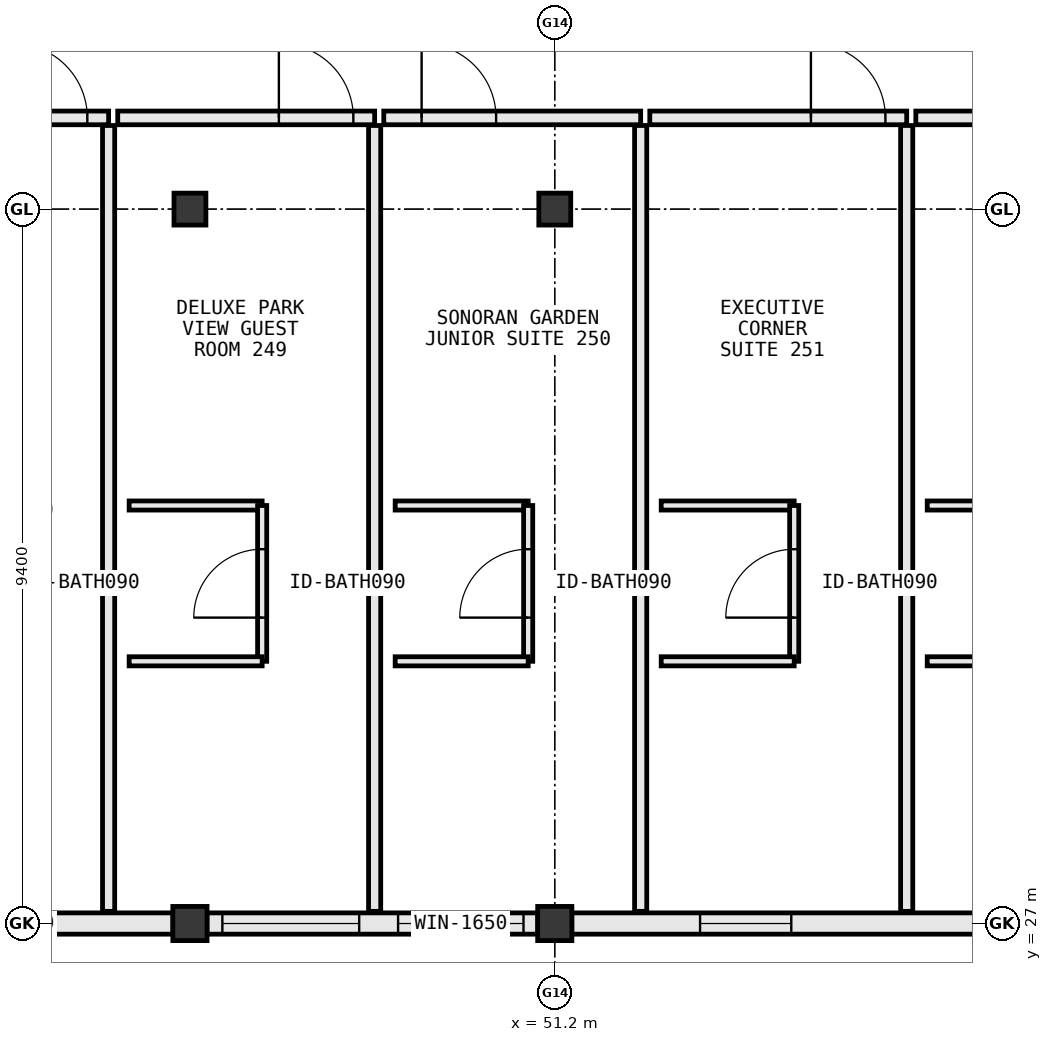
"""IFC4 building model, lengths in metres.
Left out: names, types, materials, properties, quantities, classifications, styles, units other than length and angle.
Written with IfcOpenShell. Run it as: python <this file> out.ifc"""

import sys

from ifc_helpers import new_model, si_unit, direction, frame, frame_2d, origin, origin_2d, place, context, subcontext, project, spatial, rectangle, extrude, element, fill, save


model = new_model("IFC4")
c1 = context("Model", 3, precision=1e-05, world=origin(), true_north=direction((0.0, 1.0)))
c2 = subcontext(c1, "Body", "Model", "MODEL_VIEW")
j1 = project(units=[si_unit("LENGTHUNIT", "METRE"), si_unit("PLANEANGLEUNIT", "RADIAN")], contexts=[c1])
p1 = place(None, origin())
s1 = spatial("IfcSite", under=j1, at=p1, CompositionType="ELEMENT")
p2 = place(p1, origin())
s2 = spatial("IfcBuilding", under=s1, at=p2, CompositionType="ELEMENT")
p3 = place(p2, frame((0.0, 0.0, 35.2)))
s3 = spatial("IfcBuildingStorey", under=s2, at=p3, CompositionType="ELEMENT", Elevation=35.2)
p4 = place(p3, frame((46.4, 27.0, 0.0), z_axis=(0.0, 0.0, 1.0), x_axis=(1.0, 0.0, 0.0)))
e1 = element("IfcColumn", 1, at=p4, inside=s3, PredefinedType="COLUMN", context=c2, shape_type="SweptSolid", body=[
    extrude(rectangle(XDim=0.45, YDim=0.45, at=origin_2d()), origin(), (0.0, 0.0, 1.0), 3.8),
])
p5 = place(p3, frame((46.4, 36.4, 0.0), z_axis=(0.0, 0.0, 1.0), x_axis=(1.0, 0.0, 0.0)))
e2 = element("IfcColumn", 2, at=p5, inside=s3, PredefinedType="COLUMN", context=c2, shape_type="SweptSolid", body=[
    extrude(rectangle(XDim=0.42, YDim=0.42, at=origin_2d()), origin(), (0.0, 0.0, 1.0), 3.8),
])
p6 = place(p3, frame((51.2, 27.0, 0.0), z_axis=(0.0, 0.0, 1.0), x_axis=(1.0, 0.0, 0.0)))
e3 = element("IfcColumn", 3, at=p6, inside=s3, PredefinedType="COLUMN", context=c2, shape_type="SweptSolid", body=[
    extrude(rectangle(XDim=0.45, YDim=0.45, at=origin_2d()), origin(), (0.0, 0.0, 1.0), 3.8),
])
p7 = place(p3, frame((51.2, 36.4, 0.0), z_axis=(0.0, 0.0, 1.0), x_axis=(1.0, 0.0, 0.0)))
e4 = element("IfcColumn", 4, at=p7, inside=s3, PredefinedType="COLUMN", context=c2, shape_type="SweptSolid", body=[
    extrude(rectangle(XDim=0.42, YDim=0.42, at=origin_2d()), origin(), (0.0, 0.0, 1.0), 3.8),
])
p8 = place(p3, frame((41.823, 27.0, 0.0), z_axis=(0.0, 0.0, 1.0), x_axis=(1.0, 0.0, 0.0)))
e5 = element("IfcWall", 5, at=p8, inside=s3, PredefinedType="STANDARD", context=c2, shape_type="SweptSolid", body=[
    extrude(rectangle(XDim=4.354, YDim=0.28, at=frame_2d((2.177, 0.0))), origin(), (0.0, 0.0, 1.0), 3.02),
])
p9 = place(p8, frame((1.577, 0.0, 0.85)))
e6 = element("IfcOpeningElement", 6, at=p9, cuts=e5, PredefinedType="OPENING", context=c2, shape_type="SweptSolid", body=[
    extrude(rectangle(XDim=1.2, YDim=1.55, at=frame_2d((0.6, 0.775))), frame((0.0, 0.152, 0.0), z_axis=(0.0, -1.0, 0.0), x_axis=(1.0, 0.0, 0.0)), (0.0, 0.0, 1.0), 0.304),
])
p10 = place(p3, frame((46.623, 27.0, 0.0), z_axis=(0.0, 0.0, 1.0), x_axis=(1.0, 0.0, 0.0)))
e7 = element("IfcWall", 7, at=p10, inside=s3, PredefinedType="STANDARD", context=c2, shape_type="SweptSolid", body=[
    extrude(rectangle(XDim=4.354, YDim=0.28, at=frame_2d((2.177, 0.0))), origin(), (0.0, 0.0, 1.0), 3.02),
])
p11 = place(p10, frame((0.204, 0.0, 0.85)))
e8 = element("IfcOpeningElement", 8, at=p11, cuts=e7, PredefinedType="OPENING", context=c2, shape_type="SweptSolid", body=[
    extrude(rectangle(XDim=1.8, YDim=1.85, at=frame_2d((0.9, 0.925))), frame((0.0, 0.152, 0.0), z_axis=(0.0, -1.0, 0.0), x_axis=(1.0, 0.0, 0.0)), (0.0, 0.0, 1.0), 0.304),
])
p12 = place(p10, frame((2.515, 0.0, 0.85)))
e9 = element("IfcOpeningElement", 9, at=p12, cuts=e7, PredefinedType="OPENING", context=c2, shape_type="SweptSolid", body=[
    extrude(rectangle(XDim=1.65, YDim=1.8, at=frame_2d((0.825, 0.9))), frame((0.0, 0.152, 0.0), z_axis=(0.0, -1.0, 0.0), x_axis=(1.0, 0.0, 0.0)), (0.0, 0.0, 1.0), 0.304),
])
p13 = place(p3, frame((51.423, 27.0, 0.0), z_axis=(0.0, 0.0, 1.0), x_axis=(1.0, 0.0, 0.0)))
e10 = element("IfcWall", 10, at=p13, inside=s3, PredefinedType="STANDARD", context=c2, shape_type="SweptSolid", body=[
    extrude(rectangle(XDim=9.154, YDim=0.28, at=frame_2d((4.577, 0.0))), origin(), (0.0, 0.0, 1.0), 2.84),
])
p14 = place(p13, frame((1.688, 0.0, 0.85)))
e11 = element("IfcOpeningElement", 11, at=p14, cuts=e10, PredefinedType="OPENING", context=c2, shape_type="SweptSolid", body=[
    extrude(rectangle(XDim=1.2, YDim=1.55, at=frame_2d((0.6, 0.775))), frame((0.0, 0.152, 0.0), z_axis=(0.0, -1.0, 0.0), x_axis=(1.0, 0.0, 0.0)), (0.0, 0.0, 1.0), 0.304),
])
p15 = place(p13, frame((6.265, 0.0, 0.85)))
e12 = element("IfcOpeningElement", 12, at=p15, cuts=e10, PredefinedType="OPENING", context=c2, shape_type="SweptSolid", body=[
    extrude(rectangle(XDim=1.2, YDim=1.55, at=frame_2d((0.6, 0.775))), frame((0.0, 0.152, 0.0), z_axis=(0.0, -1.0, 0.0), x_axis=(1.0, 0.0, 0.0)), (0.0, 0.0, 1.0), 0.304),
])
p16 = place(p3, frame((45.33, 37.6, 0.0), z_axis=(0.0, 0.0, 1.0), x_axis=(-1.0, 0.0, 0.0)))
e13 = element("IfcWall", 13, at=p16, inside=s3, PredefinedType="PARTITIONING", context=c2, shape_type="SweptSolid", body=[
    extrude(rectangle(XDim=3.38, YDim=0.18, at=frame_2d((1.69, 0.0))), origin(), (0.0, 0.0, 1.0), 3.565),
])
p17 = place(p16, frame((0.28, 0.0, 0.0)))
e14 = element("IfcOpeningElement", 14, at=p17, cuts=e13, PredefinedType="OPENING", context=c2, shape_type="SweptSolid", body=[
    extrude(rectangle(XDim=0.98, YDim=2.18, at=frame_2d((0.49, 1.09))), frame((0.0, 0.102, 0.0), z_axis=(0.0, -1.0, 0.0), x_axis=(1.0, 0.0, 0.0)), (0.0, 0.0, 1.0), 0.204),
])
p18 = place(p3, frame((45.33, 27.16, 0.0), z_axis=(0.0, 0.0, 1.0), x_axis=(0.0, 1.0, 0.0)))
e15 = element("IfcWall", 15, at=p18, inside=s3, PredefinedType="PARTITIONING", context=c2, shape_type="SweptSolid", body=[
    extrude(rectangle(XDim=10.34, YDim=0.16, at=frame_2d((5.17, 0.0))), origin(), (0.0, 0.0, 1.0), 3.565),
])
p19 = place(p3, frame((48.83, 37.6, 0.0), z_axis=(0.0, 0.0, 1.0), x_axis=(-1.0, 0.0, 0.0)))
e16 = element("IfcWall", 16, at=p19, inside=s3, PredefinedType="PARTITIONING", context=c2, shape_type="SweptSolid", body=[
    extrude(rectangle(XDim=3.38, YDim=0.18, at=frame_2d((1.69, 0.0))), origin(), (0.0, 0.0, 1.0), 3.565),
])
p20 = place(p19, frame((0.28, 0.0, 0.0)))
e17 = element("IfcOpeningElement", 17, at=p20, cuts=e16, PredefinedType="OPENING", context=c2, shape_type="SweptSolid", body=[
    extrude(rectangle(XDim=0.98, YDim=2.18, at=frame_2d((0.49, 1.09))), frame((0.0, 0.102, 0.0), z_axis=(0.0, -1.0, 0.0), x_axis=(1.0, 0.0, 0.0)), (0.0, 0.0, 1.0), 0.204),
])
p21 = place(p3, frame((48.83, 27.16, 0.0), z_axis=(0.0, 0.0, 1.0), x_axis=(0.0, 1.0, 0.0)))
e18 = element("IfcWall", 18, at=p21, inside=s3, PredefinedType="PARTITIONING", context=c2, shape_type="SweptSolid", body=[
    extrude(rectangle(XDim=10.34, YDim=0.16, at=frame_2d((5.17, 0.0))), origin(), (0.0, 0.0, 1.0), 3.11),
])
p22 = place(p3, frame((45.6, 32.5, 0.0), z_axis=(0.0, 0.0, 1.0), x_axis=(1.0, 0.0, 0.0)))
e19 = element("IfcWall", 19, at=p22, inside=s3, PredefinedType="PARTITIONING", context=c2, shape_type="SweptSolid", body=[
    extrude(rectangle(XDim=1.75, YDim=0.12, at=frame_2d((0.875, 0.0))), origin(), (0.0, 0.0, 1.0), 3.565),
])
p23 = place(p3, frame((47.35, 30.45, 0.0), z_axis=(0.0, 0.0, 1.0), x_axis=(0.0, 1.0, 0.0)))
e20 = element("IfcWall", 20, at=p23, inside=s3, PredefinedType="PARTITIONING", context=c2, shape_type="SweptSolid", body=[
    extrude(rectangle(XDim=2.05, YDim=0.12, at=frame_2d((1.025, 0.0))), origin(), (0.0, 0.0, 1.0), 3.565),
])
p24 = place(p23, frame((0.575, 0.0, 0.0)))
e21 = element("IfcOpeningElement", 21, at=p24, cuts=e20, PredefinedType="OPENING", context=c2, shape_type="SweptSolid", body=[
    extrude(rectangle(XDim=0.9, YDim=2.15, at=frame_2d((0.45, 1.075))), frame((0.0, 0.072, 0.0), z_axis=(0.0, -1.0, 0.0), x_axis=(1.0, 0.0, 0.0)), (0.0, 0.0, 1.0), 0.144),
])
p25 = place(p3, frame((45.6, 30.45, 0.0), z_axis=(0.0, 0.0, 1.0), x_axis=(1.0, 0.0, 0.0)))
e22 = element("IfcWall", 22, at=p25, inside=s3, PredefinedType="PARTITIONING", context=c2, shape_type="SweptSolid", body=[
    extrude(rectangle(XDim=1.75, YDim=0.12, at=frame_2d((0.875, 0.0))), origin(), (0.0, 0.0, 1.0), 3.565),
])
p26 = place(p3, frame((52.33, 37.6, 0.0), z_axis=(0.0, 0.0, 1.0), x_axis=(-1.0, 0.0, 0.0)))
e23 = element("IfcWall", 23, at=p26, inside=s3, PredefinedType="PARTITIONING", context=c2, shape_type="SweptSolid", body=[
    extrude(rectangle(XDim=3.38, YDim=0.18, at=frame_2d((1.69, 0.0))), origin(), (0.0, 0.0, 1.0), 3.565),
])
p27 = place(p26, frame((1.902, 0.0, 0.0)))
e24 = element("IfcOpeningElement", 24, at=p27, cuts=e23, PredefinedType="OPENING", context=c2, shape_type="SweptSolid", body=[
    extrude(rectangle(XDim=0.98, YDim=2.18, at=frame_2d((0.49, 1.09))), frame((0.0, 0.102, 0.0), z_axis=(0.0, -1.0, 0.0), x_axis=(1.0, 0.0, 0.0)), (0.0, 0.0, 1.0), 0.204),
])
p28 = place(p3, frame((52.33, 27.16, 0.0), z_axis=(0.0, 0.0, 1.0), x_axis=(0.0, 1.0, 0.0)))
e25 = element("IfcWall", 25, at=p28, inside=s3, PredefinedType="PARTITIONING", context=c2, shape_type="SweptSolid", body=[
    extrude(rectangle(XDim=10.34, YDim=0.16, at=frame_2d((5.17, 0.0))), origin(), (0.0, 0.0, 1.0), 3.565),
])
p29 = place(p3, frame((49.1, 32.5, 0.0), z_axis=(0.0, 0.0, 1.0), x_axis=(1.0, 0.0, 0.0)))
e26 = element("IfcWall", 26, at=p29, inside=s3, PredefinedType="PARTITIONING", context=c2, shape_type="SweptSolid", body=[
    extrude(rectangle(XDim=1.75, YDim=0.12, at=frame_2d((0.875, 0.0))), origin(), (0.0, 0.0, 1.0), 3.565),
])
p30 = place(p3, frame((50.85, 30.45, 0.0), z_axis=(0.0, 0.0, 1.0), x_axis=(0.0, 1.0, 0.0)))
e27 = element("IfcWall", 27, at=p30, inside=s3, PredefinedType="PARTITIONING", context=c2, shape_type="SweptSolid", body=[
    extrude(rectangle(XDim=2.05, YDim=0.12, at=frame_2d((1.025, 0.0))), origin(), (0.0, 0.0, 1.0), 2.94),
])
p31 = place(p30, frame((0.575, 0.0, 0.0)))
e28 = element("IfcOpeningElement", 28, at=p31, cuts=e27, PredefinedType="OPENING", context=c2, shape_type="SweptSolid", body=[
    extrude(rectangle(XDim=0.9, YDim=2.15, at=frame_2d((0.45, 1.075))), frame((0.0, 0.072, 0.0), z_axis=(0.0, -1.0, 0.0), x_axis=(1.0, 0.0, 0.0)), (0.0, 0.0, 1.0), 0.144),
])
p32 = place(p3, frame((49.1, 30.45, 0.0), z_axis=(0.0, 0.0, 1.0), x_axis=(1.0, 0.0, 0.0)))
e29 = element("IfcWall", 29, at=p32, inside=s3, PredefinedType="PARTITIONING", context=c2, shape_type="SweptSolid", body=[
    extrude(rectangle(XDim=1.75, YDim=0.12, at=frame_2d((0.875, 0.0))), origin(), (0.0, 0.0, 1.0), 3.565),
])
p33 = place(p3, frame((55.83, 37.6, 0.0), z_axis=(0.0, 0.0, 1.0), x_axis=(-1.0, 0.0, 0.0)))
e30 = element("IfcWall", 30, at=p33, inside=s3, PredefinedType="PARTITIONING", context=c2, shape_type="SweptSolid", body=[
    extrude(rectangle(XDim=3.38, YDim=0.18, at=frame_2d((1.69, 0.0))), origin(), (0.0, 0.0, 1.0), 3.565),
])
p34 = place(p33, frame((0.28, 0.0, 0.0)))
e31 = element("IfcOpeningElement", 31, at=p34, cuts=e30, PredefinedType="OPENING", context=c2, shape_type="SweptSolid", body=[
    extrude(rectangle(XDim=0.98, YDim=2.18, at=frame_2d((0.49, 1.09))), frame((0.0, 0.102, 0.0), z_axis=(0.0, -1.0, 0.0), x_axis=(1.0, 0.0, 0.0)), (0.0, 0.0, 1.0), 0.204),
])
p35 = place(p3, frame((55.83, 27.16, 0.0), z_axis=(0.0, 0.0, 1.0), x_axis=(0.0, 1.0, 0.0)))
e32 = element("IfcWall", 32, at=p35, inside=s3, PredefinedType="PARTITIONING", context=c2, shape_type="SweptSolid", body=[
    extrude(rectangle(XDim=10.34, YDim=0.16, at=frame_2d((5.17, 0.0))), origin(), (0.0, 0.0, 1.0), 3.565),
])
p36 = place(p3, frame((52.6, 32.5, 0.0), z_axis=(0.0, 0.0, 1.0), x_axis=(1.0, 0.0, 0.0)))
e33 = element("IfcWall", 33, at=p36, inside=s3, PredefinedType="PARTITIONING", context=c2, shape_type="SweptSolid", body=[
    extrude(rectangle(XDim=1.75, YDim=0.12, at=frame_2d((0.875, 0.0))), origin(), (0.0, 0.0, 1.0), 3.565),
])
p37 = place(p3, frame((54.35, 30.45, 0.0), z_axis=(0.0, 0.0, 1.0), x_axis=(0.0, 1.0, 0.0)))
e34 = element("IfcWall", 34, at=p37, inside=s3, PredefinedType="PARTITIONING", context=c2, shape_type="SweptSolid", body=[
    extrude(rectangle(XDim=2.05, YDim=0.12, at=frame_2d((1.025, 0.0))), origin(), (0.0, 0.0, 1.0), 3.11),
])
p38 = place(p37, frame((0.575, 0.0, 0.0)))
e35 = element("IfcOpeningElement", 35, at=p38, cuts=e34, PredefinedType="OPENING", context=c2, shape_type="SweptSolid", body=[
    extrude(rectangle(XDim=0.9, YDim=2.15, at=frame_2d((0.45, 1.075))), frame((0.0, 0.072, 0.0), z_axis=(0.0, -1.0, 0.0), x_axis=(1.0, 0.0, 0.0)), (0.0, 0.0, 1.0), 0.144),
])
p39 = place(p3, frame((52.6, 30.45, 0.0), z_axis=(0.0, 0.0, 1.0), x_axis=(1.0, 0.0, 0.0)))
e36 = element("IfcWall", 36, at=p39, inside=s3, PredefinedType="PARTITIONING", context=c2, shape_type="SweptSolid", body=[
    extrude(rectangle(XDim=1.75, YDim=0.12, at=frame_2d((0.875, 0.0))), origin(), (0.0, 0.0, 1.0), 3.565),
])
p40 = place(p3, frame((59.33, 37.6, 0.0), z_axis=(0.0, 0.0, 1.0), x_axis=(-1.0, 0.0, 0.0)))
e37 = element("IfcWall", 37, at=p40, inside=s3, PredefinedType="PARTITIONING", context=c2, shape_type="SweptSolid", body=[
    extrude(rectangle(XDim=3.38, YDim=0.18, at=frame_2d((1.69, 0.0))), origin(), (0.0, 0.0, 1.0), 3.565),
])
p41 = place(p40, frame((0.28, 0.0, 0.0)))
e38 = element("IfcOpeningElement", 38, at=p41, cuts=e37, PredefinedType="OPENING", context=c2, shape_type="SweptSolid", body=[
    extrude(rectangle(XDim=0.98, YDim=2.18, at=frame_2d((0.49, 1.09))), frame((0.0, 0.102, 0.0), z_axis=(0.0, -1.0, 0.0), x_axis=(1.0, 0.0, 0.0)), (0.0, 0.0, 1.0), 0.204),
])
for number, where, z_axis, x_axis in (
    (39, (56.1, 32.5, 0.0), (0.0, 0.0, 1.0), (1.0, 0.0, 0.0)),
    (40, (56.1, 30.45, 0.0), (0.0, 0.0, 1.0), (1.0, 0.0, 0.0)),
):
    element("IfcWall", number, at=place(p3, frame(where, z_axis=z_axis, x_axis=x_axis)), inside=s3, PredefinedType="PARTITIONING", context=c2, shape_type="SweptSolid", body=[
        extrude(rectangle(XDim=1.75, YDim=0.12, at=frame_2d((0.875, 0.0))), origin(), (0.0, 0.0, 1.0), 3.565),
    ])
p42 = place(p9, origin())
e41 = element("IfcWindow", 41, at=p42, inside=s3, PartitioningType="SINGLE_PANEL", PredefinedType="WINDOW", context=c2, shape_type="SweptSolid", body=[
    extrude(rectangle(XDim=1.2, YDim=1.55, at=frame_2d((0.6, 0.775))), frame((0.0, 0.03, 0.0), z_axis=(0.0, -1.0, 0.0), x_axis=(1.0, 0.0, 0.0)), (0.0, 0.0, 1.0), 0.06),
])
fill(e6, e41)
p43 = place(p14, origin())
e42 = element("IfcWindow", 42, at=p43, inside=s3, PartitioningType="SINGLE_PANEL", PredefinedType="WINDOW", context=c2, shape_type="SweptSolid", body=[
    extrude(rectangle(XDim=1.2, YDim=1.55, at=frame_2d((0.6, 0.775))), frame((0.0, 0.03, 0.0), z_axis=(0.0, -1.0, 0.0), x_axis=(1.0, 0.0, 0.0)), (0.0, 0.0, 1.0), 0.06),
])
fill(e11, e42)
p44 = place(p11, origin())
e43 = element("IfcWindow", 43, at=p44, inside=s3, PartitioningType="SINGLE_PANEL", PredefinedType="WINDOW", context=c2, shape_type="SweptSolid", body=[
    extrude(rectangle(XDim=1.8, YDim=1.85, at=frame_2d((0.9, 0.925))), frame((0.0, 0.03, 0.0), z_axis=(0.0, -1.0, 0.0), x_axis=(1.0, 0.0, 0.0)), (0.0, 0.0, 1.0), 0.06),
])
fill(e8, e43)
p45 = place(p12, origin())
e44 = element("IfcWindow", 44, at=p45, inside=s3, PartitioningType="SINGLE_PANEL", PredefinedType="WINDOW", context=c2, shape_type="SweptSolid", body=[
    extrude(rectangle(XDim=1.65, YDim=1.8, at=frame_2d((0.825, 0.9))), frame((0.0, 0.03, 0.0), z_axis=(0.0, -1.0, 0.0), x_axis=(1.0, 0.0, 0.0)), (0.0, 0.0, 1.0), 0.06),
])
fill(e9, e44)
p46 = place(p17, frame((0.98, 0.0, 0.0), z_axis=(0.0, 0.0, 1.0), x_axis=(-1.0, 0.0, 0.0)))
e45 = element("IfcDoor", 45, at=p46, inside=s3, OperationType="SINGLE_SWING_RIGHT", PredefinedType="DOOR", context=c2, shape_type="SweptSolid", body=[
    extrude(rectangle(XDim=0.98, YDim=2.18, at=frame_2d((0.49, 1.09))), frame((0.0, 0.025, 0.0), z_axis=(0.0, -1.0, 0.0), x_axis=(1.0, 0.0, 0.0)), (0.0, 0.0, 1.0), 0.05),
])
fill(e14, e45)
p47 = place(p20, frame((0.98, 0.0, 0.0), z_axis=(0.0, 0.0, 1.0), x_axis=(-1.0, 0.0, 0.0)))
e46 = element("IfcDoor", 46, at=p47, inside=s3, OperationType="SINGLE_SWING_RIGHT", PredefinedType="DOOR", context=c2, shape_type="SweptSolid", body=[
    extrude(rectangle(XDim=0.98, YDim=2.18, at=frame_2d((0.49, 1.09))), frame((0.0, 0.025, 0.0), z_axis=(0.0, -1.0, 0.0), x_axis=(1.0, 0.0, 0.0)), (0.0, 0.0, 1.0), 0.05),
])
fill(e17, e46)
p48 = place(p24, origin())
e47 = element("IfcDoor", 47, at=p48, inside=s3, OperationType="SINGLE_SWING_LEFT", PredefinedType="DOOR", context=c2, shape_type="SweptSolid", body=[
    extrude(rectangle(XDim=0.9, YDim=2.15, at=frame_2d((0.45, 1.075))), frame((0.0, 0.025, 0.0), z_axis=(0.0, -1.0, 0.0), x_axis=(1.0, 0.0, 0.0)), (0.0, 0.0, 1.0), 0.05),
])
fill(e21, e47)
p49 = place(p27, frame((0.98, 0.0, 0.0), z_axis=(0.0, 0.0, 1.0), x_axis=(-1.0, 0.0, 0.0)))
e48 = element("IfcDoor", 48, at=p49, inside=s3, OperationType="SINGLE_SWING_RIGHT", PredefinedType="DOOR", context=c2, shape_type="SweptSolid", body=[
    extrude(rectangle(XDim=0.98, YDim=2.18, at=frame_2d((0.49, 1.09))), frame((0.0, 0.025, 0.0), z_axis=(0.0, -1.0, 0.0), x_axis=(1.0, 0.0, 0.0)), (0.0, 0.0, 1.0), 0.05),
])
fill(e24, e48)
p50 = place(p31, origin())
e49 = element("IfcDoor", 49, at=p50, inside=s3, OperationType="SINGLE_SWING_LEFT", PredefinedType="DOOR", context=c2, shape_type="SweptSolid", body=[
    extrude(rectangle(XDim=0.9, YDim=2.15, at=frame_2d((0.45, 1.075))), frame((0.0, 0.025, 0.0), z_axis=(0.0, -1.0, 0.0), x_axis=(1.0, 0.0, 0.0)), (0.0, 0.0, 1.0), 0.05),
])
fill(e28, e49)
p51 = place(p34, frame((0.98, 0.0, 0.0), z_axis=(0.0, 0.0, 1.0), x_axis=(-1.0, 0.0, 0.0)))
e50 = element("IfcDoor", 50, at=p51, inside=s3, OperationType="SINGLE_SWING_RIGHT", PredefinedType="DOOR", context=c2, shape_type="SweptSolid", body=[
    extrude(rectangle(XDim=0.98, YDim=2.18, at=frame_2d((0.49, 1.09))), frame((0.0, 0.025, 0.0), z_axis=(0.0, -1.0, 0.0), x_axis=(1.0, 0.0, 0.0)), (0.0, 0.0, 1.0), 0.05),
])
fill(e31, e50)
p52 = place(p38, origin())
e51 = element("IfcDoor", 51, at=p52, inside=s3, OperationType="SINGLE_SWING_LEFT", PredefinedType="DOOR", context=c2, shape_type="SweptSolid", body=[
    extrude(rectangle(XDim=0.9, YDim=2.15, at=frame_2d((0.45, 1.075))), frame((0.0, 0.025, 0.0), z_axis=(0.0, -1.0, 0.0), x_axis=(1.0, 0.0, 0.0)), (0.0, 0.0, 1.0), 0.05),
])
fill(e35, e51)
save(model, sys.argv[1])
